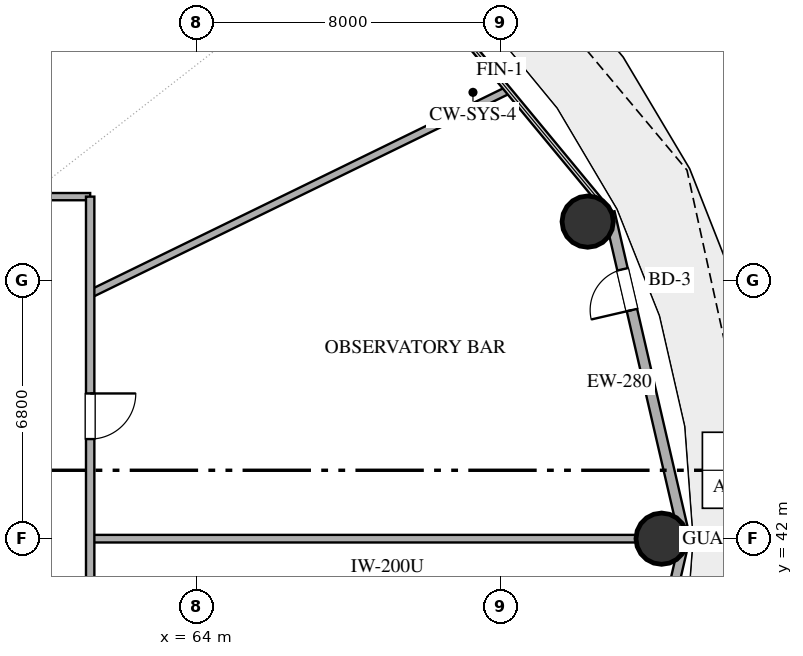
"""IFC4 building model, lengths in metres.
Left out: names, types, materials, properties, quantities, classifications, styles, units other than length and angle.
Written with IfcOpenShell. Run it as: python <this file> out.ifc"""

import sys

from ifc_helpers import new_model, si_unit, direction, frame, frame_2d, origin, origin_2d, place, context, subcontext, project, spatial, rectangle, hollow_circle, extrude, element, fill, save


model = new_model("IFC4")
c1 = context("Model", 3, precision=1e-05, world=origin(), true_north=direction((0.0, 1.0)))
c2 = subcontext(c1, "Body", "Model", "MODEL_VIEW")
j1 = project(units=[si_unit("LENGTHUNIT", "METRE"), si_unit("PLANEANGLEUNIT", "RADIAN")], contexts=[c1])
p1 = place(None, origin())
s1 = spatial("IfcSite", under=j1, at=p1, CompositionType="ELEMENT")
p2 = place(p1, origin())
s2 = spatial("IfcBuilding", under=s1, at=p2, CompositionType="ELEMENT")
p3 = place(p2, frame((0.0, 0.0, 134.4)))
s3 = spatial("IfcBuildingStorey", under=s2, at=p3, CompositionType="ELEMENT", Elevation=134.4)
for number, where, z_axis, x_axis in (
    (1, (76.237, 42.0, 0.0), (0.0, 0.0, 1.0), (1.0, 0.0, 0.0)),
    (2, (74.291, 50.343, 0.0), (0.0, 0.0, 1.0), (1.0, 0.0, 0.0)),
):
    element("IfcColumn", number, at=place(p3, frame(where, z_axis=z_axis, x_axis=x_axis)), inside=s3, PredefinedType="COLUMN", context=c2, shape_type="SweptSolid", body=[
        extrude(hollow_circle(Radius=0.675, WallThickness=0.036, at=origin_2d()), origin(), (0.0, 0.0, 1.0), 5.05),
    ])
p4 = place(p3, frame((76.849, 42.0, 0.0), z_axis=(0.0, 0.0, 1.0), x_axis=(-0.22558597182, 0.974223264616, 0.0)))
e3 = element("IfcWall", 3, at=p4, inside=s3, PredefinedType="SOLIDWALL", context=c2, shape_type="SweptSolid", body=[
    extrude(rectangle(XDim=8.811, YDim=0.28, at=frame_2d((4.405, 0.0))), origin(), (0.0, 0.0, 1.0), 5.05),
])
p5 = place(p4, frame((6.175, 0.0, 0.0)))
e4 = element("IfcOpeningElement", 4, at=p5, cuts=e3, PredefinedType="OPENING", context=c2, shape_type="SweptSolid", body=[
    extrude(rectangle(XDim=1.1, YDim=2.25, at=frame_2d((0.55, 1.125))), frame((0.0, 0.15, 0.0), z_axis=(0.0, -1.0, 0.0), x_axis=(1.0, 0.0, 0.0)), (0.0, 0.0, 1.0), 0.3),
])
p6 = place(p3, frame((74.861, 33.417, 0.0), z_axis=(0.0, 0.0, 1.0), x_axis=(0.22558597182, 0.974223264616, 0.0)))
e5 = element("IfcWall", 5, at=p6, inside=s3, PredefinedType="SOLIDWALL", context=c2, shape_type="SweptSolid", body=[
    extrude(rectangle(XDim=8.811, YDim=0.25, at=frame_2d((4.405, 0.0))), origin(), (0.0, 0.0, 1.0), 5.05),
])
p7 = place(p3, frame((76.849, 42.0, 0.0), z_axis=(0.0, 0.0, 1.0), x_axis=(-1.0, 0.0, 0.0)))
e6 = element("IfcWall", 6, at=p7, inside=s3, PredefinedType="PARTITIONING", context=c2, shape_type="SweptSolid", body=[
    extrude(rectangle(XDim=15.649, YDim=0.2, at=frame_2d((7.825, 0.0))), origin(), (0.0, 0.0, 1.0), 4.35),
])
p8 = place(p3, frame((34.8, 51.0, 0.0), z_axis=(0.0, 0.0, 1.0), x_axis=(1.0, 0.0, 0.0)))
e7 = element("IfcWall", 7, at=p8, inside=s3, PredefinedType="PARTITIONING", context=c2, shape_type="SweptSolid", body=[
    extrude(rectangle(XDim=26.4, YDim=0.19, at=frame_2d((13.2, 0.0))), origin(), (0.0, 0.0, 1.0), 4.35),
])
p9 = place(p8, frame((7.452, 0.0, 0.0)))
e8 = element("IfcOpeningElement", 8, at=p9, cuts=e7, PredefinedType="OPENING", context=c2, shape_type="SweptSolid", body=[
    extrude(rectangle(XDim=1.2, YDim=2.25, at=frame_2d((0.6, 1.125))), frame((0.0, 0.105, 0.0), z_axis=(0.0, -1.0, 0.0), x_axis=(1.0, 0.0, 0.0)), (0.0, 0.0, 1.0), 0.21),
])
p10 = place(p8, frame((20.474, 0.0, 0.0)))
e9 = element("IfcOpeningElement", 9, at=p10, cuts=e7, PredefinedType="OPENING", context=c2, shape_type="SweptSolid", body=[
    extrude(rectangle(XDim=1.2, YDim=2.25, at=frame_2d((0.6, 1.125))), frame((0.0, 0.105, 0.0), z_axis=(0.0, -1.0, 0.0), x_axis=(1.0, 0.0, 0.0)), (0.0, 0.0, 1.0), 0.21),
])
p11 = place(p3, frame((72.198, 53.802, 0.0), z_axis=(0.0, 0.0, 1.0), x_axis=(-0.898789153873, -0.438381177608, 0.0)))
e10 = element("IfcWall", 10, at=p11, inside=s3, PredefinedType="PARTITIONING", context=c2, shape_type="SweptSolid", body=[
    extrude(rectangle(XDim=12.237, YDim=0.2, at=frame_2d((6.118, 0.0))), origin(), (0.0, 0.0, 1.0), 4.35),
])
p12 = place(p3, frame((61.2, 51.0, 0.0), z_axis=(0.0, 0.0, 1.0), x_axis=(0.0, -1.0, 0.0)))
e11 = element("IfcWall", 11, at=p12, inside=s3, PredefinedType="SOLIDWALL", context=c2, shape_type="SweptSolid", body=[
    extrude(rectangle(XDim=18.0, YDim=0.22, at=frame_2d((9.0, 0.0))), origin(), (0.0, 0.0, 1.0), 4.35),
])
p13 = place(p12, frame((11.911, 0.0, 0.0)))
e12 = element("IfcOpeningElement", 12, at=p13, cuts=e11, PredefinedType="OPENING", context=c2, shape_type="SweptSolid", body=[
    extrude(rectangle(XDim=1.2, YDim=2.25, at=frame_2d((0.6, 1.125))), frame((0.0, 0.12, 0.0), z_axis=(0.0, -1.0, 0.0), x_axis=(1.0, 0.0, 0.0)), (0.0, 0.0, 1.0), 0.24),
])
p14 = place(p12, frame((5.179, 0.0, 0.0)))
e13 = element("IfcOpeningElement", 13, at=p14, cuts=e11, PredefinedType="OPENING", context=c2, shape_type="SweptSolid", body=[
    extrude(rectangle(XDim=1.2, YDim=2.25, at=frame_2d((0.6, 1.125))), frame((0.0, 0.12, 0.0), z_axis=(0.0, -1.0, 0.0), x_axis=(1.0, 0.0, 0.0)), (0.0, 0.0, 1.0), 0.24),
])
p15 = place(p5, origin())
e14 = element("IfcDoor", 14, at=p15, inside=s3, OperationType="SINGLE_SWING_LEFT", PredefinedType="DOOR", context=c2, shape_type="SweptSolid", body=[
    extrude(rectangle(XDim=1.1, YDim=2.25, at=frame_2d((0.55, 1.125))), frame((0.0, 0.025, 0.0), z_axis=(0.0, -1.0, 0.0), x_axis=(1.0, 0.0, 0.0)), (0.0, 0.0, 1.0), 0.05),
])
fill(e4, e14)
p16 = place(p14, origin())
e15 = element("IfcDoor", 15, at=p16, inside=s3, OperationType="SINGLE_SWING_LEFT", PredefinedType="DOOR", context=c2, shape_type="SweptSolid", body=[
    extrude(rectangle(XDim=1.2, YDim=2.25, at=frame_2d((0.6, 1.125))), frame((0.0, 0.025, 0.0), z_axis=(0.0, -1.0, 0.0), x_axis=(1.0, 0.0, 0.0)), (0.0, 0.0, 1.0), 0.05),
])
fill(e13, e15)
save(model, sys.argv[1])
